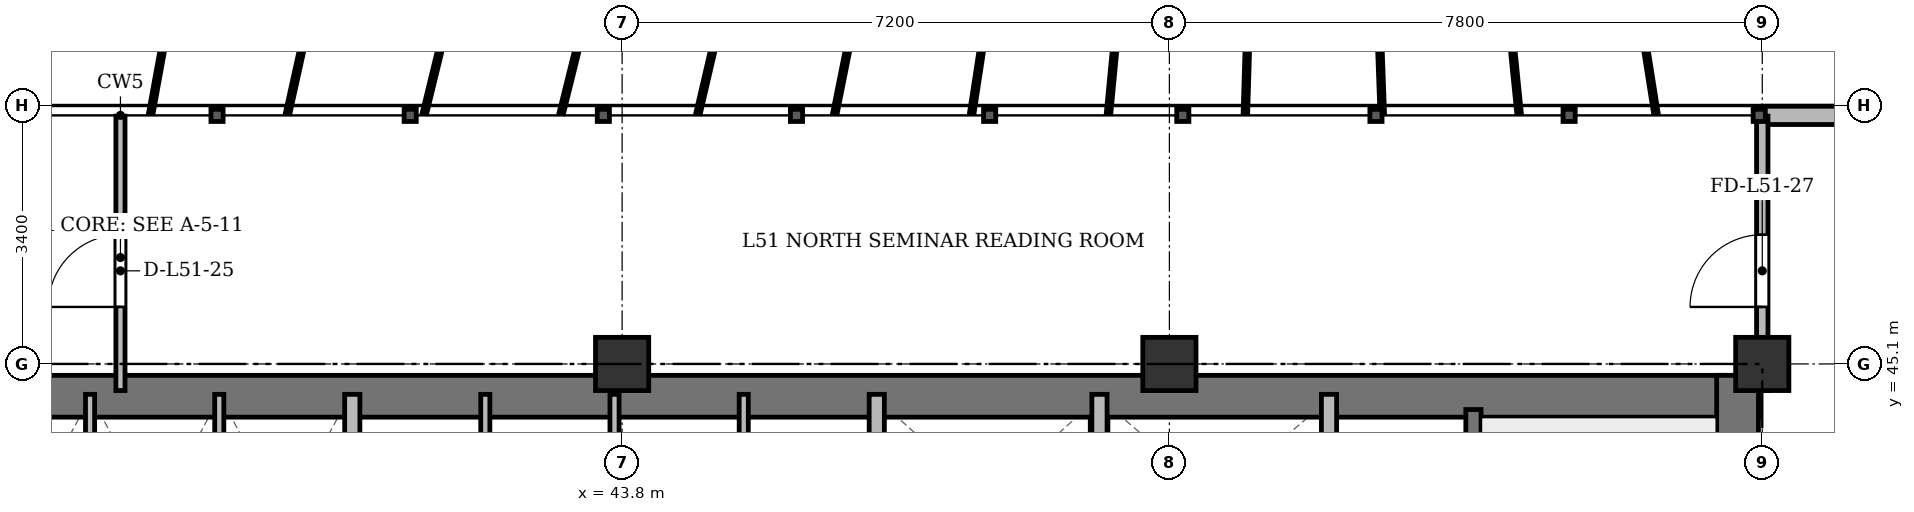
"""IFC4 building model, lengths in metres.
Left out: names, types, materials, properties, quantities, classifications, styles, units other than length and angle.
Written with IfcOpenShell. Run it as: python <this file> out.ifc"""

import sys

from ifc_helpers import new_model, si_unit, direction, frame, frame_2d, origin, origin_2d, place, context, subcontext, project, spatial, rectangle, extrude, source, transform, mapped, element, fill, save


model = new_model("IFC4")
c1 = context("Model", 3, precision=1e-05, world=origin(), true_north=direction((0.0, 1.0)))
c2 = subcontext(c1, "Body", "Model", "MODEL_VIEW")
j1 = project(units=[si_unit("LENGTHUNIT", "METRE"), si_unit("PLANEANGLEUNIT", "RADIAN")], contexts=[c1])
p1 = place(None, origin())
s1 = spatial("IfcSite", under=j1, at=p1, CompositionType="ELEMENT")
p2 = place(p1, origin())
s2 = spatial("IfcBuilding", under=s1, at=p2, CompositionType="ELEMENT")
p3 = place(p2, frame((0.0, 0.0, 197.7)))
s3 = spatial("IfcBuildingStorey", under=s2, at=p3, CompositionType="ELEMENT", Elevation=197.7)
m1 = source(origin(), c2, "Body", "SweptSolid", [
    extrude(rectangle(XDim=0.7, YDim=0.7, at=origin_2d()), origin(), (0.0, 0.0, 1.0), 3.6),
])
for number, where, z_axis, x_axis in (
    (1, (43.8, 45.1, 0.0), (0.0, 0.0, 1.0), (1.0, 0.0, 0.0)),
    (2, (51.0, 45.1, 0.0), (0.0, 0.0, 1.0), (1.0, 0.0, 0.0)),
    (3, (58.8, 45.1, 0.0), (0.0, 0.0, 1.0), (1.0, 0.0, 0.0)),
):
    element("IfcColumn", number, at=place(p3, frame(where, z_axis=z_axis, x_axis=x_axis)), inside=s3, PredefinedType="COLUMN", context=c2, shape_type="MappedRepresentation", body=[
        mapped(m1, transform((0.0, 0.0, 0.0), x_axis=(1.0, 0.0, 0.0), y_axis=(0.0, 1.0, 0.0), z_axis=(0.0, 0.0, 1.0), scale=1.0)),
    ])
p4 = place(p3, frame((58.8, 48.37, 0.0), z_axis=(0.0, 0.0, 1.0), x_axis=(1.0, 0.0, 0.0)))
e4 = element("IfcWall", 4, at=p4, inside=s3, PredefinedType="SOLIDWALL", context=c2, shape_type="SweptSolid", body=[
    extrude(rectangle(XDim=4.5, YDim=0.24, at=frame_2d((2.25, 0.0))), origin(), (0.0, 0.0, 1.0), 3.36),
])
p5 = place(p4, frame((1.483, 0.0, 0.9)))
e5 = element("IfcOpeningElement", 5, at=p5, cuts=e4, PredefinedType="OPENING", context=c2, shape_type="SweptSolid", body=[
    extrude(rectangle(XDim=1.35, YDim=1.5, at=frame_2d((0.675, 0.75))), frame((0.0, 0.13, 0.0), z_axis=(0.0, -1.0, 0.0), x_axis=(1.0, 0.0, 0.0)), (0.0, 0.0, 1.0), 0.26),
])
p6 = place(p3, frame((15.65, 44.675, 0.0), z_axis=(0.0, 0.0, 1.0), x_axis=(1.0, 0.0, 0.0)))
e6 = element("IfcWall", 6, at=p6, inside=s3, PredefinedType="SHEAR", context=c2, shape_type="SweptSolid", body=[
    extrude(rectangle(XDim=43.1, YDim=0.55, at=frame_2d((21.55, 0.0))), origin(), (0.0, 0.0, 1.0), 3.36),
])
p7 = place(p3, frame((58.475, 33.4, 0.0), z_axis=(0.0, 0.0, 1.0), x_axis=(0.0, 1.0, 0.0)))
e7 = element("IfcWall", 7, at=p7, inside=s3, PredefinedType="SHEAR", context=c2, shape_type="SweptSolid", body=[
    extrude(rectangle(XDim=11.55, YDim=0.55, at=frame_2d((5.775, 0.0))), origin(), (0.0, 0.0, 1.0), 3.36),
])
p8 = place(p3, frame((55.0, 33.4, 0.0), z_axis=(0.0, 0.0, 1.0), x_axis=(0.0, 1.0, 0.0)))
e8 = element("IfcWall", 8, at=p8, inside=s3, PredefinedType="SHEAR", context=c2, shape_type="SweptSolid", body=[
    extrude(rectangle(XDim=11.1, YDim=0.2, at=frame_2d((5.55, 0.0))), origin(), (0.0, 0.0, 1.0), 3.36),
])
p9 = place(p8, frame((0.85, 0.0, 0.0)))
e9 = element("IfcOpeningElement", 9, at=p9, cuts=e8, PredefinedType="OPENING", context=c2, shape_type="SweptSolid", body=[
    extrude(rectangle(XDim=1.1, YDim=2.15, at=frame_2d((0.55, 1.075))), frame((0.0, 0.11, 0.0), z_axis=(0.0, -1.0, 0.0), x_axis=(1.0, 0.0, 0.0)), (0.0, 0.0, 1.0), 0.22),
])
for number, where, z_axis, x_axis in (
    (10, (36.8, 41.5, 0.0), (0.0, 0.0, 1.0), (0.0, 1.0, 0.0)),
    (11, (38.5, 41.5, 0.0), (0.0, 0.0, 1.0), (0.0, 1.0, 0.0)),
):
    element("IfcWall", number, at=place(p3, frame(where, z_axis=z_axis, x_axis=x_axis)), inside=s3, PredefinedType="PARTITIONING", context=c2, shape_type="SweptSolid", body=[
        extrude(rectangle(XDim=3.2, YDim=0.12, at=frame_2d((1.6, 0.0))), origin(), (0.0, 0.0, 1.0), 3.36),
    ])
p10 = place(p3, frame((40.25, 41.5, 0.0), z_axis=(0.0, 0.0, 1.0), x_axis=(0.0, 1.0, 0.0)))
e12 = element("IfcWall", 12, at=p10, inside=s3, PredefinedType="SOLIDWALL", context=c2, shape_type="SweptSolid", body=[
    extrude(rectangle(XDim=3.2, YDim=0.2, at=frame_2d((1.6, 0.0))), origin(), (0.0, 0.0, 1.0), 3.36),
])
p11 = place(p3, frame((42.0, 41.5, 0.0), z_axis=(0.0, 0.0, 1.0), x_axis=(0.0, 1.0, 0.0)))
e13 = element("IfcWall", 13, at=p11, inside=s3, PredefinedType="PARTITIONING", context=c2, shape_type="SweptSolid", body=[
    extrude(rectangle(XDim=3.2, YDim=0.12, at=frame_2d((1.6, 0.0))), origin(), (0.0, 0.0, 1.0), 3.36),
])
p12 = place(p3, frame((43.7, 41.5, 0.0), z_axis=(0.0, 0.0, 1.0), x_axis=(0.0, 1.0, 0.0)))
e14 = element("IfcWall", 14, at=p12, inside=s3, PredefinedType="PARTITIONING", context=c2, shape_type="SweptSolid", body=[
    extrude(rectangle(XDim=3.2, YDim=0.12, at=frame_2d((1.6, 0.0))), origin(), (0.0, 0.0, 1.0), 2.86),
])
p13 = place(p3, frame((45.4, 41.5, 0.0), z_axis=(0.0, 0.0, 1.0), x_axis=(0.0, 1.0, 0.0)))
e15 = element("IfcWall", 15, at=p13, inside=s3, PredefinedType="PARTITIONING", context=c2, shape_type="SweptSolid", body=[
    extrude(rectangle(XDim=3.2, YDim=0.12, at=frame_2d((1.6, 0.0))), origin(), (0.0, 0.0, 1.0), 3.36),
])
p14 = place(p3, frame((47.15, 33.4, 0.0), z_axis=(0.0, 0.0, 1.0), x_axis=(0.0, 1.0, 0.0)))
e16 = element("IfcWall", 16, at=p14, inside=s3, PredefinedType="SOLIDWALL", context=c2, shape_type="SweptSolid", body=[
    extrude(rectangle(XDim=11.3, YDim=0.2, at=frame_2d((5.65, 0.0))), origin(), (0.0, 0.0, 1.0), 2.91),
])
for number, where, z_axis, x_axis in (
    (17, (50.08, 42.05, 0.0), (0.0, 0.0, 1.0), (0.0, 1.0, 0.0)),
    (18, (53.1, 42.05, 0.0), (0.0, 0.0, 1.0), (0.0, 1.0, 0.0)),
):
    element("IfcWall", number, at=place(p3, frame(where, z_axis=z_axis, x_axis=x_axis)), inside=s3, PredefinedType="SOLIDWALL", context=c2, shape_type="SweptSolid", body=[
        extrude(rectangle(XDim=2.65, YDim=0.2, at=frame_2d((1.325, 0.0))), origin(), (0.0, 0.0, 1.0), 3.36),
    ])
p15 = place(p3, frame((37.2, 44.75, 0.0), z_axis=(0.0, 0.0, 1.0), x_axis=(0.0, 1.0, 0.0)))
e19 = element("IfcWall", 19, at=p15, inside=s3, PredefinedType="PARTITIONING", context=c2, shape_type="SweptSolid", body=[
    extrude(rectangle(XDim=3.61, YDim=0.12, at=frame_2d((1.805, 0.0))), origin(), (0.0, 0.0, 1.0), 2.91),
])
p16 = place(p15, frame((1.1, 0.0, 0.0)))
e20 = element("IfcOpeningElement", 20, at=p16, cuts=e19, PredefinedType="OPENING", context=c2, shape_type="SweptSolid", body=[
    extrude(rectangle(XDim=0.95, YDim=2.15, at=frame_2d((0.475, 1.075))), frame((0.0, 0.07, 0.0), z_axis=(0.0, -1.0, 0.0), x_axis=(1.0, 0.0, 0.0)), (0.0, 0.0, 1.0), 0.14),
])
p17 = place(p3, frame((58.8, 44.75, 0.0), z_axis=(0.0, 0.0, 1.0), x_axis=(0.0, 1.0, 0.0)))
e21 = element("IfcWall", 21, at=p17, inside=s3, PredefinedType="PARTITIONING", context=c2, shape_type="SweptSolid", body=[
    extrude(rectangle(XDim=3.61, YDim=0.15, at=frame_2d((1.805, 0.0))), origin(), (0.0, 0.0, 1.0), 2.86),
])
p18 = place(p17, frame((1.1, 0.0, 0.0)))
e22 = element("IfcOpeningElement", 22, at=p18, cuts=e21, PredefinedType="OPENING", context=c2, shape_type="SweptSolid", body=[
    extrude(rectangle(XDim=0.95, YDim=2.15, at=frame_2d((0.475, 1.075))), frame((0.0, 0.085, 0.0), z_axis=(0.0, -1.0, 0.0), x_axis=(1.0, 0.0, 0.0)), (0.0, 0.0, 1.0), 0.17),
])
m2 = source(origin(), c2, "Body", "SweptSolid", [
    extrude(rectangle(XDim=0.95, YDim=2.15, at=frame_2d((0.475, 1.075))), frame((0.0, 0.025, 0.0), z_axis=(0.0, -1.0, 0.0), x_axis=(1.0, 0.0, 0.0)), (0.0, 0.0, 1.0), 0.05),
])
p19 = place(p16, origin())
e23 = element("IfcDoor", 23, at=p19, inside=s3, OperationType="SINGLE_SWING_LEFT", PredefinedType="DOOR", context=c2, shape_type="MappedRepresentation", body=[
    mapped(m2, transform((0.0, 0.0, 0.0), x_axis=(1.0, 0.0, 0.0), y_axis=(0.0, 1.0, 0.0), z_axis=(0.0, 0.0, 1.0), scale=1.0)),
])
fill(e20, e23)
p20 = place(p18, origin())
e24 = element("IfcDoor", 24, at=p20, inside=s3, OperationType="SINGLE_SWING_LEFT", PredefinedType="DOOR", context=c2, shape_type="MappedRepresentation", body=[
    mapped(m2, transform((0.0, 0.0, 0.0), x_axis=(1.0, 0.0, 0.0), y_axis=(0.0, 1.0, 0.0), z_axis=(0.0, 0.0, 1.0), scale=1.0)),
])
fill(e22, e24)
save(model, sys.argv[1])
